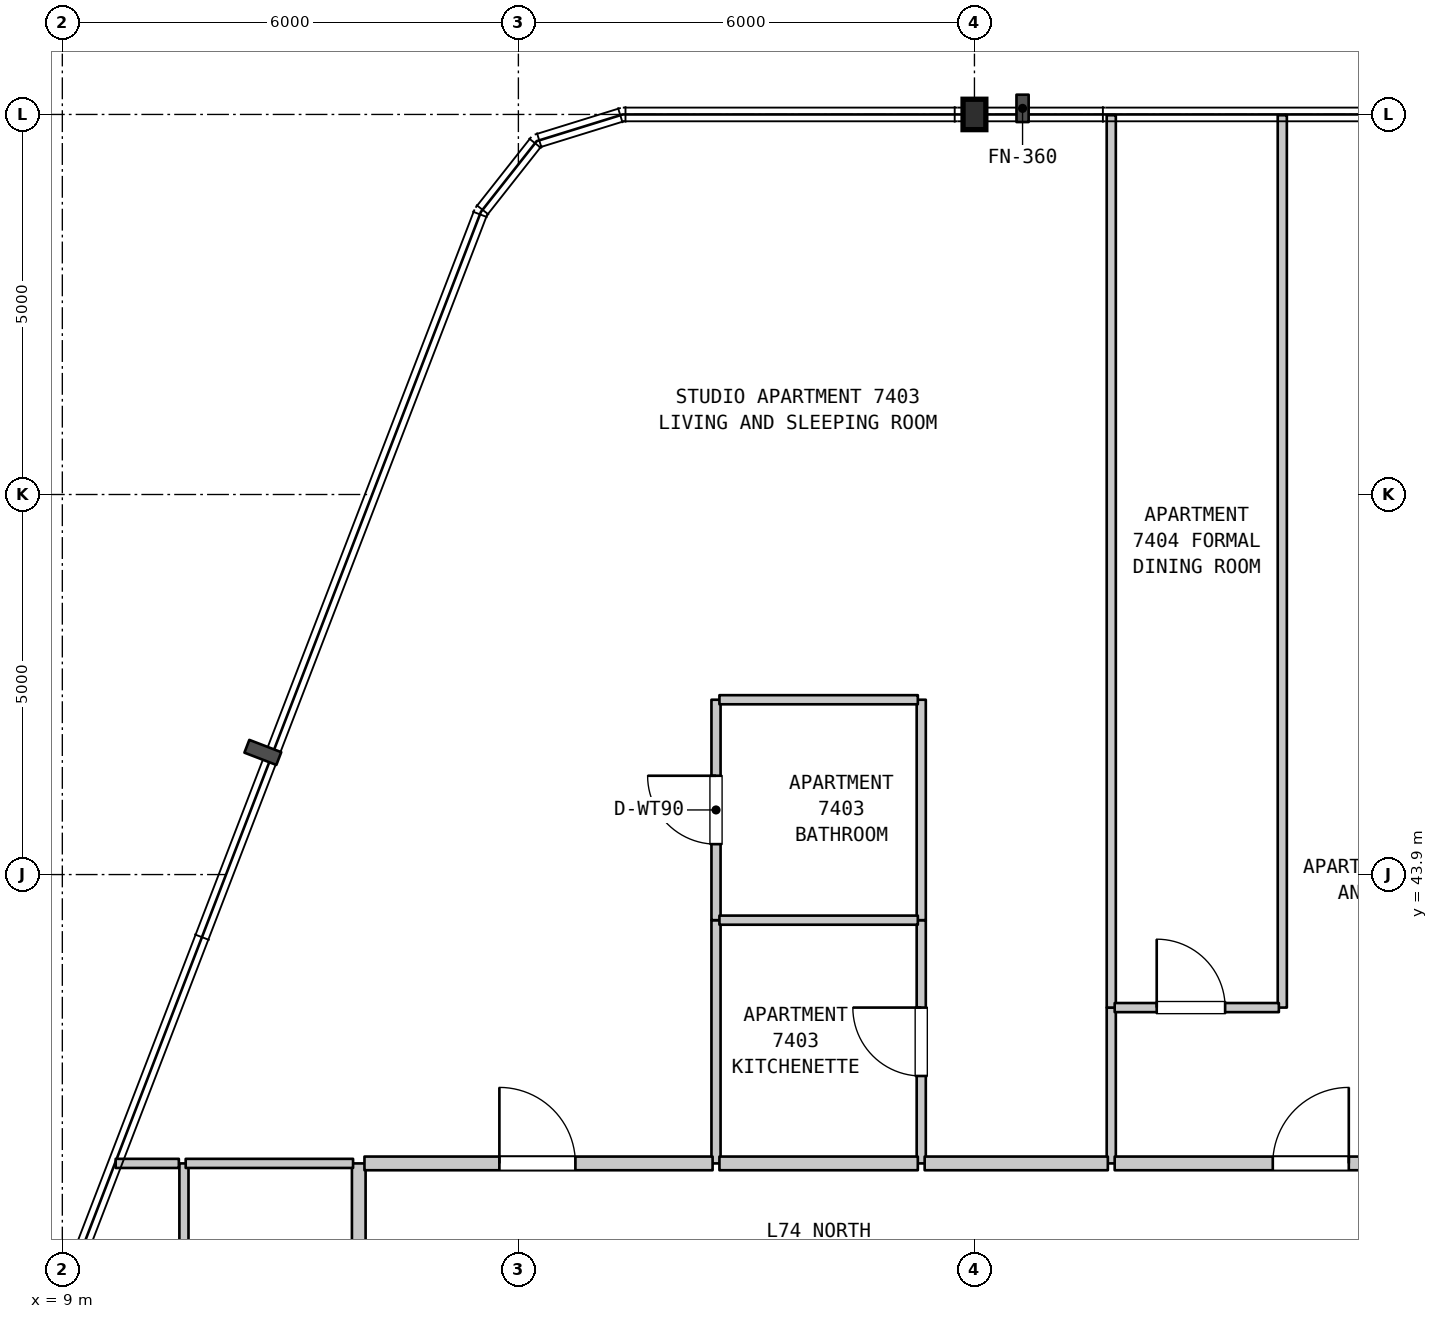
"""IFC4 building model, lengths in metres.
Left out: names, types, materials, properties, quantities, classifications, styles, units other than length and angle.
Written with IfcOpenShell. Run it as: python <this file> out.ifc"""

import sys

from ifc_helpers import new_model, si_unit, direction, frame, frame_2d, origin, origin_2d, place, context, subcontext, project, spatial, rectangle, i_section, extrude, element, fill, save


model = new_model("IFC4")
c1 = context("Model", 3, precision=1e-05, world=origin(), true_north=direction((0.0, 1.0)))
c2 = subcontext(c1, "Body", "Model", "MODEL_VIEW")
j1 = project(units=[si_unit("LENGTHUNIT", "METRE"), si_unit("PLANEANGLEUNIT", "RADIAN")], contexts=[c1])
p1 = place(None, origin())
s1 = spatial("IfcSite", under=j1, at=p1, CompositionType="ELEMENT")
p2 = place(p1, origin())
s2 = spatial("IfcBuilding", under=s1, at=p2, CompositionType="ELEMENT")
p3 = place(p2, frame((0.0, 0.0, 295.4)))
s3 = spatial("IfcBuildingStorey", under=s2, at=p3, CompositionType="ELEMENT", Elevation=295.4)
p4 = place(p3, frame((21.0, 53.9, 0.0), z_axis=(0.0, 0.0, 1.0), x_axis=(1.0, 0.0, 0.0)))
e1 = element("IfcColumn", 1, at=p4, inside=s3, PredefinedType="COLUMN", context=c2, shape_type="SweptSolid", body=[
    extrude(i_section(OverallWidth=0.3, OverallDepth=0.4, WebThickness=0.013, FlangeThickness=0.024, FilletRadius=0.027, at=origin_2d()), origin(), (0.0, 0.0, 1.0), 3.7),
])
p5 = place(p3, frame((10.6, 35.59, 0.0), z_axis=(0.0, 0.0, 1.0), x_axis=(0.0, 1.0, 0.0)))
e2 = element("IfcWall", 2, at=p5, inside=s3, PredefinedType="PARTITIONING", context=c2, shape_type="SweptSolid", body=[
    extrude(rectangle(XDim=4.51, YDim=0.12, at=frame_2d((2.255, 0.0))), origin(), (0.0, 0.0, 1.0), 3.38),
])
p6 = place(p3, frame((12.9, 35.59, 0.0), z_axis=(0.0, 0.0, 1.0), x_axis=(0.0, 1.0, 0.0)))
e3 = element("IfcWall", 3, at=p6, inside=s3, PredefinedType="STANDARD", context=c2, shape_type="SweptSolid", body=[
    extrude(rectangle(XDim=4.51, YDim=0.18, at=frame_2d((2.255, 0.0))), origin(), (0.0, 0.0, 1.0), 3.38),
])
p7 = place(p3, frame((17.6, 40.1, 0.0), z_axis=(0.0, 0.0, 1.0), x_axis=(0.0, 1.0, 0.0)))
e4 = element("IfcWall", 4, at=p7, inside=s3, PredefinedType="PARTITIONING", context=c2, shape_type="SweptSolid", body=[
    extrude(rectangle(XDim=3.2, YDim=0.12, at=frame_2d((1.6, 0.0))), origin(), (0.0, 0.0, 1.0), 3.38),
])
p8 = place(p3, frame((17.6, 43.3, 0.0), z_axis=(0.0, 0.0, 1.0), x_axis=(0.0, 1.0, 0.0)))
e5 = element("IfcWall", 5, at=p8, inside=s3, PredefinedType="PARTITIONING", context=c2, shape_type="SweptSolid", body=[
    extrude(rectangle(XDim=2.9, YDim=0.12, at=frame_2d((1.45, 0.0))), origin(), (0.0, 0.0, 1.0), 3.38),
])
p9 = place(p8, frame((1.0, 0.0, 0.0)))
e6 = element("IfcOpeningElement", 6, at=p9, cuts=e5, PredefinedType="OPENING", context=c2, shape_type="SweptSolid", body=[
    extrude(rectangle(XDim=0.9, YDim=2.1, at=frame_2d((0.45, 1.05))), frame((0.0, 0.07, 0.0), z_axis=(0.0, -1.0, 0.0), x_axis=(1.0, 0.0, 0.0)), (0.0, 0.0, 1.0), 0.14),
])
p10 = place(p3, frame((20.3, 40.1, 0.0), z_axis=(0.0, 0.0, 1.0), x_axis=(0.0, 1.0, 0.0)))
e7 = element("IfcWall", 7, at=p10, inside=s3, PredefinedType="PARTITIONING", context=c2, shape_type="SweptSolid", body=[
    extrude(rectangle(XDim=3.2, YDim=0.12, at=frame_2d((1.6, 0.0))), origin(), (0.0, 0.0, 1.0), 3.38),
])
p11 = place(p10, frame((1.15, 0.0, 0.0)))
e8 = element("IfcOpeningElement", 8, at=p11, cuts=e7, PredefinedType="OPENING", context=c2, shape_type="SweptSolid", body=[
    extrude(rectangle(XDim=0.9, YDim=2.15, at=frame_2d((0.45, 1.075))), frame((0.0, 0.07, 0.0), z_axis=(0.0, -1.0, 0.0), x_axis=(1.0, 0.0, 0.0)), (0.0, 0.0, 1.0), 0.14),
])
p12 = place(p3, frame((20.3, 43.3, 0.0), z_axis=(0.0, 0.0, 1.0), x_axis=(0.0, 1.0, 0.0)))
e9 = element("IfcWall", 9, at=p12, inside=s3, PredefinedType="PARTITIONING", context=c2, shape_type="SweptSolid", body=[
    extrude(rectangle(XDim=2.9, YDim=0.12, at=frame_2d((1.45, 0.0))), origin(), (0.0, 0.0, 1.0), 3.38),
])
p13 = place(p3, frame((22.8, 40.1, 0.0), z_axis=(0.0, 0.0, 1.0), x_axis=(0.0, 1.0, 0.0)))
e10 = element("IfcWall", 10, at=p13, inside=s3, PredefinedType="PARTITIONING", context=c2, shape_type="SweptSolid", body=[
    extrude(rectangle(XDim=2.05, YDim=0.12, at=frame_2d((1.025, 0.0))), origin(), (0.0, 0.0, 1.0), 3.38),
])
for number, where, z_axis, x_axis in (
    (11, (22.8, 42.15, 0.0), (0.0, 0.0, 1.0), (0.0, 1.0, 0.0)),
    (12, (25.05, 42.15, 0.0), (0.0, 0.0, 1.0), (0.0, 1.0, 0.0)),
):
    element("IfcWall", number, at=place(p3, frame(where, z_axis=z_axis, x_axis=x_axis)), inside=s3, PredefinedType="PARTITIONING", context=c2, shape_type="SweptSolid", body=[
        extrude(rectangle(XDim=11.74, YDim=0.12, at=frame_2d((5.87, 0.0))), origin(), (0.0, 0.0, 1.0), 3.38),
    ])
p14 = place(p3, frame((9.702, 40.1, 0.0), z_axis=(0.0, 0.0, 1.0), x_axis=(1.0, 0.0, 0.0)))
e13 = element("IfcWall", 13, at=p14, inside=s3, PredefinedType="PARTITIONING", context=c2, shape_type="SweptSolid", body=[
    extrude(rectangle(XDim=0.831, YDim=0.12, at=frame_2d((0.416, 0.0))), origin(), (0.0, 0.0, 1.0), 3.38),
])
p15 = place(p3, frame((10.623, 40.1, 0.0), z_axis=(0.0, 0.0, 1.0), x_axis=(1.0, 0.0, 0.0)))
e14 = element("IfcWall", 14, at=p15, inside=s3, PredefinedType="PARTITIONING", context=c2, shape_type="SweptSolid", body=[
    extrude(rectangle(XDim=2.202, YDim=0.12, at=frame_2d((1.101, 0.0))), origin(), (0.0, 0.0, 1.0), 3.38),
])
p16 = place(p3, frame((12.975, 40.1, 0.0), z_axis=(0.0, 0.0, 1.0), x_axis=(1.0, 0.0, 0.0)))
e15 = element("IfcWall", 15, at=p16, inside=s3, PredefinedType="STANDARD", context=c2, shape_type="SweptSolid", body=[
    extrude(rectangle(XDim=4.58, YDim=0.18, at=frame_2d((2.29, 0.0))), origin(), (0.0, 0.0, 1.0), 3.38),
])
p17 = place(p16, frame((1.775, 0.0, 0.0)))
e16 = element("IfcOpeningElement", 16, at=p17, cuts=e15, PredefinedType="OPENING", context=c2, shape_type="SweptSolid", body=[
    extrude(rectangle(XDim=1.0, YDim=2.15, at=frame_2d((0.5, 1.075))), frame((0.0, 0.1, 0.0), z_axis=(0.0, -1.0, 0.0), x_axis=(1.0, 0.0, 0.0)), (0.0, 0.0, 1.0), 0.2),
])
p18 = place(p3, frame((17.645, 40.1, 0.0), z_axis=(0.0, 0.0, 1.0), x_axis=(1.0, 0.0, 0.0)))
e17 = element("IfcWall", 17, at=p18, inside=s3, PredefinedType="STANDARD", context=c2, shape_type="SweptSolid", body=[
    extrude(rectangle(XDim=2.61, YDim=0.18, at=frame_2d((1.305, 0.0))), origin(), (0.0, 0.0, 1.0), 3.38),
])
p19 = place(p3, frame((20.345, 40.1, 0.0), z_axis=(0.0, 0.0, 1.0), x_axis=(1.0, 0.0, 0.0)))
e18 = element("IfcWall", 18, at=p19, inside=s3, PredefinedType="STANDARD", context=c2, shape_type="SweptSolid", body=[
    extrude(rectangle(XDim=2.41, YDim=0.18, at=frame_2d((1.205, 0.0))), origin(), (0.0, 0.0, 1.0), 3.38),
])
p20 = place(p3, frame((22.845, 40.1, 0.0), z_axis=(0.0, 0.0, 1.0), x_axis=(1.0, 0.0, 0.0)))
e19 = element("IfcWall", 19, at=p20, inside=s3, PredefinedType="STANDARD", context=c2, shape_type="SweptSolid", body=[
    extrude(rectangle(XDim=5.095, YDim=0.18, at=frame_2d((2.547, 0.0))), origin(), (0.0, 0.0, 1.0), 3.38),
])
p21 = place(p20, frame((2.08, 0.0, 0.0)))
e20 = element("IfcOpeningElement", 20, at=p21, cuts=e19, PredefinedType="OPENING", context=c2, shape_type="SweptSolid", body=[
    extrude(rectangle(XDim=1.0, YDim=2.15, at=frame_2d((0.5, 1.075))), frame((0.0, 0.1, 0.0), z_axis=(0.0, -1.0, 0.0), x_axis=(1.0, 0.0, 0.0)), (0.0, 0.0, 1.0), 0.2),
])
p22 = place(p3, frame((22.845, 42.15, 0.0), z_axis=(0.0, 0.0, 1.0), x_axis=(1.0, 0.0, 0.0)))
e21 = element("IfcWall", 21, at=p22, inside=s3, PredefinedType="PARTITIONING", context=c2, shape_type="SweptSolid", body=[
    extrude(rectangle(XDim=2.16, YDim=0.12, at=frame_2d((1.08, 0.0))), origin(), (0.0, 0.0, 1.0), 3.38),
])
p23 = place(p22, frame((0.553, 0.0, 0.0)))
e22 = element("IfcOpeningElement", 22, at=p23, cuts=e21, PredefinedType="OPENING", context=c2, shape_type="SweptSolid", body=[
    extrude(rectangle(XDim=0.9, YDim=2.15, at=frame_2d((0.45, 1.075))), frame((0.0, 0.07, 0.0), z_axis=(0.0, -1.0, 0.0), x_axis=(1.0, 0.0, 0.0)), (0.0, 0.0, 1.0), 0.14),
])
for number, where, z_axis, x_axis in (
    (23, (17.645, 43.3, 0.0), (0.0, 0.0, 1.0), (1.0, 0.0, 0.0)),
    (24, (17.645, 46.2, 0.0), (0.0, 0.0, 1.0), (1.0, 0.0, 0.0)),
):
    element("IfcWall", number, at=place(p3, frame(where, z_axis=z_axis, x_axis=x_axis)), inside=s3, PredefinedType="PARTITIONING", context=c2, shape_type="SweptSolid", body=[
        extrude(rectangle(XDim=2.61, YDim=0.12, at=frame_2d((1.305, 0.0))), origin(), (0.0, 0.0, 1.0), 3.38),
    ])
p24 = place(p9, origin())
e25 = element("IfcDoor", 25, at=p24, inside=s3, OperationType="SINGLE_SWING_RIGHT", PredefinedType="DOOR", context=c2, shape_type="SweptSolid", body=[
    extrude(rectangle(XDim=0.9, YDim=2.1, at=frame_2d((0.45, 1.05))), frame((0.0, 0.025, 0.0), z_axis=(0.0, -1.0, 0.0), x_axis=(1.0, 0.0, 0.0)), (0.0, 0.0, 1.0), 0.05),
])
fill(e6, e25)
p25 = place(p11, origin())
e26 = element("IfcDoor", 26, at=p25, inside=s3, OperationType="SINGLE_SWING_RIGHT", PredefinedType="DOOR", context=c2, shape_type="SweptSolid", body=[
    extrude(rectangle(XDim=0.9, YDim=2.15, at=frame_2d((0.45, 1.075))), frame((0.0, 0.025, 0.0), z_axis=(0.0, -1.0, 0.0), x_axis=(1.0, 0.0, 0.0)), (0.0, 0.0, 1.0), 0.05),
])
fill(e8, e26)
p26 = place(p17, origin())
e27 = element("IfcDoor", 27, at=p26, inside=s3, OperationType="SINGLE_SWING_LEFT", PredefinedType="DOOR", context=c2, shape_type="SweptSolid", body=[
    extrude(rectangle(XDim=1.0, YDim=2.15, at=frame_2d((0.5, 1.075))), frame((0.0, 0.025, 0.0), z_axis=(0.0, -1.0, 0.0), x_axis=(1.0, 0.0, 0.0)), (0.0, 0.0, 1.0), 0.05),
])
fill(e16, e27)
p27 = place(p21, origin())
e28 = element("IfcDoor", 28, at=p27, inside=s3, OperationType="SINGLE_SWING_RIGHT", PredefinedType="DOOR", context=c2, shape_type="SweptSolid", body=[
    extrude(rectangle(XDim=1.0, YDim=2.15, at=frame_2d((0.5, 1.075))), frame((0.0, 0.025, 0.0), z_axis=(0.0, -1.0, 0.0), x_axis=(1.0, 0.0, 0.0)), (0.0, 0.0, 1.0), 0.05),
])
fill(e20, e28)
p28 = place(p23, origin())
e29 = element("IfcDoor", 29, at=p28, inside=s3, OperationType="SINGLE_SWING_LEFT", PredefinedType="DOOR", context=c2, shape_type="SweptSolid", body=[
    extrude(rectangle(XDim=0.9, YDim=2.15, at=frame_2d((0.45, 1.075))), frame((0.0, 0.025, 0.0), z_axis=(0.0, -1.0, 0.0), x_axis=(1.0, 0.0, 0.0)), (0.0, 0.0, 1.0), 0.05),
])
fill(e22, e29)
save(model, sys.argv[1])
